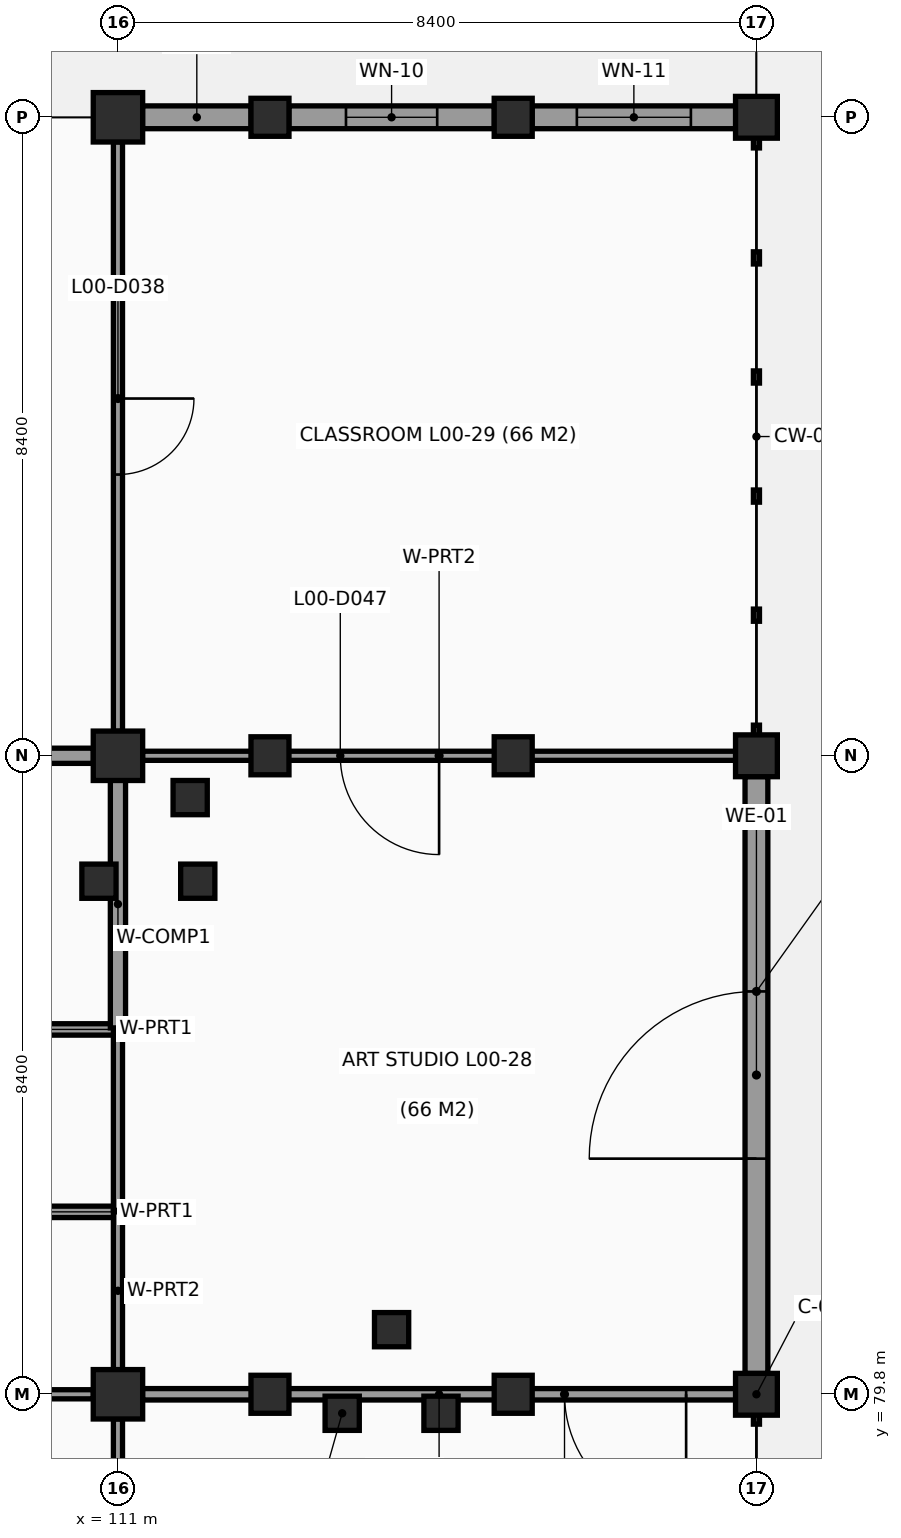
"""IFC4 building model, lengths in metres.
Left out: names, types, materials, properties, quantities, classifications, styles, units other than length and angle.
Written with IfcOpenShell. Run it as: python <this file> out.ifc"""

import sys

from ifc_helpers import new_model, si_unit, direction, frame, frame_2d, origin, origin_2d, place, context, subcontext, project, spatial, rectangle, extrude, element, fill, save


model = new_model("IFC4")
c1 = context("Model", 3, precision=1e-05, world=origin(), true_north=direction((0.0, 1.0)))
c2 = subcontext(c1, "Body", "Model", "MODEL_VIEW")
j1 = project(units=[si_unit("LENGTHUNIT", "METRE"), si_unit("PLANEANGLEUNIT", "RADIAN")], contexts=[c1])
p1 = place(None, origin())
s1 = spatial("IfcSite", under=j1, at=p1, CompositionType="ELEMENT")
p2 = place(p1, origin())
s2 = spatial("IfcBuilding", under=s1, at=p2, CompositionType="ELEMENT")
p3 = place(p2, origin())
s3 = spatial("IfcBuildingStorey", under=s2, at=p3, CompositionType="ELEMENT", Elevation=0.0)
for number, where, z_axis, x_axis in (
    (1, (111.0, 79.8, -0.4), (0.0, 0.0, 1.0), (1.0, 0.0, 0.0)),
    (2, (111.0, 88.2, -0.4), (0.0, 0.0, 1.0), (1.0, 0.0, 0.0)),
    (3, (111.0, 96.6, -0.4), (0.0, 0.0, 1.0), (1.0, 0.0, 0.0)),
):
    element("IfcColumn", number, at=place(p3, frame(where, z_axis=z_axis, x_axis=x_axis)), inside=s3, PredefinedType="COLUMN", context=c2, shape_type="SweptSolid", body=[
        extrude(rectangle(XDim=0.65, YDim=0.65, at=origin_2d()), origin(), (0.0, 0.0, 1.0), 4.6),
    ])
for number, where, z_axis, x_axis in (
    (4, (119.4, 79.8, -0.4), (0.0, 0.0, 1.0), (1.0, 0.0, 0.0)),
    (5, (119.4, 88.2, -0.4), (0.0, 0.0, 1.0), (1.0, 0.0, 0.0)),
    (6, (119.4, 96.6, -0.4), (0.0, 0.0, 1.0), (1.0, 0.0, 0.0)),
):
    element("IfcColumn", number, at=place(p3, frame(where, z_axis=z_axis, x_axis=x_axis)), inside=s3, PredefinedType="COLUMN", context=c2, shape_type="SweptSolid", body=[
        extrude(rectangle(XDim=0.55, YDim=0.55, at=origin_2d()), origin(), (0.0, 0.0, 1.0), 4.6),
    ])
for number, where, z_axis, x_axis in (
    (7, (116.2, 79.8, -0.4), (0.0, 0.0, 1.0), (1.0, 0.0, 0.0)),
    (8, (116.2, 88.2, -0.4), (0.0, 0.0, 1.0), (1.0, 0.0, 0.0)),
    (9, (116.2, 96.6, -0.4), (0.0, 0.0, 1.0), (1.0, 0.0, 0.0)),
    (10, (113.0, 79.8, -0.4), (0.0, 0.0, 1.0), (1.0, 0.0, 0.0)),
    (11, (113.0, 88.2, -0.4), (0.0, 0.0, 1.0), (1.0, 0.0, 0.0)),
    (12, (113.0, 96.6, -0.4), (0.0, 0.0, 1.0), (1.0, 0.0, 0.0)),
):
    element("IfcColumn", number, at=place(p3, frame(where, z_axis=z_axis, x_axis=x_axis)), inside=s3, PredefinedType="COLUMN", context=c2, shape_type="SweptSolid", body=[
        extrude(rectangle(XDim=0.5, YDim=0.5, at=origin_2d()), origin(), (0.0, 0.0, 1.0), 4.6),
    ])
for number, where, z_axis, x_axis in (
    (13, (113.95, 79.55, -0.4), (0.0, 0.0, 1.0), (1.0, 0.0, 0.0)),
    (14, (115.25, 79.55, -0.4), (0.0, 0.0, 1.0), (1.0, 0.0, 0.0)),
    (15, (114.6, 80.65, -0.4), (0.0, 0.0, 1.0), (1.0, 0.0, 0.0)),
    (16, (110.75, 86.55, -0.4), (0.0, 0.0, 1.0), (1.0, 0.0, 0.0)),
    (17, (112.05, 86.55, -0.4), (0.0, 0.0, 1.0), (1.0, 0.0, 0.0)),
    (18, (111.95, 87.65, -0.4), (0.0, 0.0, 1.0), (1.0, 0.0, 0.0)),
):
    element("IfcColumn", number, at=place(p3, frame(where, z_axis=z_axis, x_axis=x_axis)), inside=s3, PredefinedType="COLUMN", context=c2, shape_type="SweptSolid", body=[
        extrude(rectangle(XDim=0.45, YDim=0.45, at=origin_2d()), origin(), (0.0, 0.0, 1.0), 4.6),
    ])
p4 = place(p3, frame((111.323, 96.6, 0.0), z_axis=(0.0, 0.0, 1.0), x_axis=(1.0, 0.0, 0.0)))
e19 = element("IfcWall", 19, at=p4, inside=s3, PredefinedType="SOLIDWALL", context=c2, shape_type="SweptSolid", body=[
    extrude(rectangle(XDim=1.429, YDim=0.3, at=frame_2d((0.714, 0.0))), origin(), (0.0, 0.0, 1.0), 3.22),
])
p5 = place(p3, frame((113.248, 96.6, 0.0), z_axis=(0.0, 0.0, 1.0), x_axis=(1.0, 0.0, 0.0)))
e20 = element("IfcWall", 20, at=p5, inside=s3, PredefinedType="SOLIDWALL", context=c2, shape_type="SweptSolid", body=[
    extrude(rectangle(XDim=2.704, YDim=0.3, at=frame_2d((1.352, 0.0))), origin(), (0.0, 0.0, 1.0), 3.22),
])
p6 = place(p5, frame((0.752, 0.0, 0.95)))
e21 = element("IfcOpeningElement", 21, at=p6, cuts=e20, PredefinedType="OPENING", context=c2, shape_type="SweptSolid", body=[
    extrude(rectangle(XDim=1.2, YDim=1.5, at=frame_2d((0.6, 0.75))), frame((0.0, 0.16, 0.0), z_axis=(0.0, -1.0, 0.0), x_axis=(1.0, 0.0, 0.0)), (0.0, 0.0, 1.0), 0.32),
])
p7 = place(p3, frame((116.448, 96.6, 0.0), z_axis=(0.0, 0.0, 1.0), x_axis=(1.0, 0.0, 0.0)))
e22 = element("IfcWall", 22, at=p7, inside=s3, PredefinedType="SOLIDWALL", context=c2, shape_type="SweptSolid", body=[
    extrude(rectangle(XDim=2.679, YDim=0.3, at=frame_2d((1.339, 0.0))), origin(), (0.0, 0.0, 1.0), 3.22),
])
p8 = place(p7, frame((0.59, 0.0, 0.95)))
e23 = element("IfcOpeningElement", 23, at=p8, cuts=e22, PredefinedType="OPENING", context=c2, shape_type="SweptSolid", body=[
    extrude(rectangle(XDim=1.5, YDim=1.5, at=frame_2d((0.75, 0.75))), frame((0.0, 0.16, 0.0), z_axis=(0.0, -1.0, 0.0), x_axis=(1.0, 0.0, 0.0)), (0.0, 0.0, 1.0), 0.32),
])
p9 = place(p3, frame((119.4, 87.927, 0.0), z_axis=(0.0, 0.0, 1.0), x_axis=(0.0, -1.0, 0.0)))
e24 = element("IfcWall", 24, at=p9, inside=s3, PredefinedType="SOLIDWALL", context=c2, shape_type="SweptSolid", body=[
    extrude(rectangle(XDim=7.854, YDim=0.3, at=frame_2d((3.927, 0.0))), origin(), (0.0, 0.0, 1.0), 3.22),
])
p10 = place(p9, frame((2.827, 0.0, 0.0)))
e25 = element("IfcOpeningElement", 25, at=p10, cuts=e24, PredefinedType="OPENING", context=c2, shape_type="SweptSolid", body=[
    extrude(rectangle(XDim=2.2, YDim=2.35, at=frame_2d((1.1, 1.175))), frame((0.0, 0.16, 0.0), z_axis=(0.0, -1.0, 0.0), x_axis=(1.0, 0.0, 0.0)), (0.0, 0.0, 1.0), 0.32),
])
p11 = place(p3, frame((110.677, 79.8, 0.0), z_axis=(0.0, 0.0, 1.0), x_axis=(-1.0, 0.0, 0.0)))
e26 = element("IfcWall", 26, at=p11, inside=s3, PredefinedType="PARTITIONING", context=c2, shape_type="SweptSolid", body=[
    extrude(rectangle(XDim=3.857, YDim=0.12, at=frame_2d((1.928, 0.0))), origin(), (0.0, 0.0, 1.0), 3.12),
])
p12 = place(p3, frame((106.82, 82.2, 0.0), z_axis=(0.0, 0.0, 1.0), x_axis=(1.0, 0.0, 0.0)))
e27 = element("IfcWall", 27, at=p12, inside=s3, PredefinedType="PARTITIONING", context=c2, shape_type="SweptSolid", body=[
    extrude(rectangle(XDim=4.18, YDim=0.15, at=frame_2d((2.09, 0.0))), origin(), (0.0, 0.0, 1.0), 3.27),
])
p13 = place(p12, frame((1.465, 0.0, 0.0)))
e28 = element("IfcOpeningElement", 28, at=p13, cuts=e27, PredefinedType="OPENING", context=c2, shape_type="SweptSolid", body=[
    extrude(rectangle(XDim=1.25, YDim=2.15, at=frame_2d((0.625, 1.075))), frame((0.0, 0.085, 0.0), z_axis=(0.0, -1.0, 0.0), x_axis=(1.0, 0.0, 0.0)), (0.0, 0.0, 1.0), 0.17),
])
p14 = place(p3, frame((111.0, 82.2, 0.0), z_axis=(0.0, 0.0, 1.0), x_axis=(0.0, -1.0, 0.0)))
e29 = element("IfcWall", 29, at=p14, inside=s3, PredefinedType="PARTITIONING", context=c2, shape_type="SweptSolid", body=[
    extrude(rectangle(XDim=2.077, YDim=0.12, at=frame_2d((1.039, 0.0))), origin(), (0.0, 0.0, 1.0), 3.27),
])
p15 = place(p3, frame((106.8, 84.6, 0.0), z_axis=(0.0, 0.0, 1.0), x_axis=(1.0, 0.0, 0.0)))
e30 = element("IfcWall", 30, at=p15, inside=s3, PredefinedType="PARTITIONING", context=c2, shape_type="SweptSolid", body=[
    extrude(rectangle(XDim=4.2, YDim=0.15, at=frame_2d((2.1, 0.0))), origin(), (0.0, 0.0, 1.0), 3.27),
])
p16 = place(p15, frame((1.575, 0.0, 0.0)))
e31 = element("IfcOpeningElement", 31, at=p16, cuts=e30, PredefinedType="OPENING", context=c2, shape_type="SweptSolid", body=[
    extrude(rectangle(XDim=1.05, YDim=2.15, at=frame_2d((0.525, 1.075))), frame((0.0, 0.085, 0.0), z_axis=(0.0, -1.0, 0.0), x_axis=(1.0, 0.0, 0.0)), (0.0, 0.0, 1.0), 0.17),
])
p17 = place(p3, frame((111.0, 84.6, 0.0), z_axis=(0.0, 0.0, 1.0), x_axis=(0.0, -1.0, 0.0)))
e32 = element("IfcWall", 32, at=p17, inside=s3, PredefinedType="PARTITIONING", context=c2, shape_type="SweptSolid", body=[
    extrude(rectangle(XDim=2.38, YDim=0.12, at=frame_2d((1.19, 0.0))), origin(), (0.0, 0.0, 1.0), 3.27),
])
p18 = place(p3, frame((106.82, 88.2, 0.0), z_axis=(0.0, 0.0, 1.0), x_axis=(1.0, 0.0, 0.0)))
e33 = element("IfcWall", 33, at=p18, inside=s3, PredefinedType="PARTITIONING", context=c2, shape_type="SweptSolid", body=[
    extrude(rectangle(XDim=3.857, YDim=0.2, at=frame_2d((1.928, 0.0))), origin(), (0.0, 0.0, 1.0), 3.47),
])
p19 = place(p18, frame((0.503, 0.0, 0.0)))
e34 = element("IfcOpeningElement", 34, at=p19, cuts=e33, PredefinedType="OPENING", context=c2, shape_type="SweptSolid", body=[
    extrude(rectangle(XDim=1.55, YDim=2.2, at=frame_2d((0.775, 1.1))), frame((0.0, 0.11, 0.0), z_axis=(0.0, -1.0, 0.0), x_axis=(1.0, 0.0, 0.0)), (0.0, 0.0, 1.0), 0.22),
])
p20 = place(p3, frame((111.0, 87.877, 0.0), z_axis=(0.0, 0.0, 1.0), x_axis=(0.0, -1.0, 0.0)))
e35 = element("IfcWall", 35, at=p20, inside=s3, PredefinedType="PARTITIONING", context=c2, shape_type="SweptSolid", body=[
    extrude(rectangle(XDim=3.257, YDim=0.2, at=frame_2d((1.628, 0.0))), origin(), (0.0, 0.0, 1.0), 3.27),
])
p21 = place(p3, frame((111.0, 79.477, 0.0), z_axis=(0.0, 0.0, 1.0), x_axis=(0.0, -1.0, 0.0)))
e36 = element("IfcWall", 36, at=p21, inside=s3, PredefinedType="PARTITIONING", context=c2, shape_type="SweptSolid", body=[
    extrude(rectangle(XDim=5.304, YDim=0.12, at=frame_2d((2.652, 0.0))), origin(), (0.0, 0.0, 1.0), 3.27),
])
p22 = place(p3, frame((111.0, 96.277, 0.0), z_axis=(0.0, 0.0, 1.0), x_axis=(0.0, -1.0, 0.0)))
e37 = element("IfcWall", 37, at=p22, inside=s3, PredefinedType="PARTITIONING", context=c2, shape_type="SweptSolid", body=[
    extrude(rectangle(XDim=7.754, YDim=0.12, at=frame_2d((3.877, 0.0))), origin(), (0.0, 0.0, 1.0), 3.27),
])
p23 = place(p22, frame((3.377, 0.0, 0.0)))
e38 = element("IfcOpeningElement", 38, at=p23, cuts=e37, PredefinedType="OPENING", context=c2, shape_type="SweptSolid", body=[
    extrude(rectangle(XDim=1.0, YDim=2.1, at=frame_2d((0.5, 1.05))), frame((0.0, 0.07, 0.0), z_axis=(0.0, -1.0, 0.0), x_axis=(1.0, 0.0, 0.0)), (0.0, 0.0, 1.0), 0.14),
])
p24 = place(p3, frame((111.323, 79.8, 0.0), z_axis=(0.0, 0.0, 1.0), x_axis=(1.0, 0.0, 0.0)))
e39 = element("IfcWall", 39, at=p24, inside=s3, PredefinedType="PARTITIONING", context=c2, shape_type="SweptSolid", body=[
    extrude(rectangle(XDim=7.804, YDim=0.15, at=frame_2d((3.902, 0.0))), origin(), (0.0, 0.0, 1.0), 3.12),
])
p25 = place(p24, frame((5.552, 0.0, 0.0)))
e40 = element("IfcOpeningElement", 40, at=p25, cuts=e39, PredefinedType="OPENING", context=c2, shape_type="SweptSolid", body=[
    extrude(rectangle(XDim=1.6, YDim=2.2, at=frame_2d((0.8, 1.1))), frame((0.0, 0.085, 0.0), z_axis=(0.0, -1.0, 0.0), x_axis=(1.0, 0.0, 0.0)), (0.0, 0.0, 1.0), 0.17),
])
p26 = place(p3, frame((111.323, 88.2, 0.0), z_axis=(0.0, 0.0, 1.0), x_axis=(1.0, 0.0, 0.0)))
e41 = element("IfcWall", 41, at=p26, inside=s3, PredefinedType="PARTITIONING", context=c2, shape_type="SweptSolid", body=[
    extrude(rectangle(XDim=7.804, YDim=0.12, at=frame_2d((3.902, 0.0))), origin(), (0.0, 0.0, 1.0), 3.47),
])
p27 = place(p26, frame((2.602, 0.0, 0.0)))
e42 = element("IfcOpeningElement", 42, at=p27, cuts=e41, PredefinedType="OPENING", context=c2, shape_type="SweptSolid", body=[
    extrude(rectangle(XDim=1.3, YDim=2.15, at=frame_2d((0.65, 1.075))), frame((0.0, 0.07, 0.0), z_axis=(0.0, -1.0, 0.0), x_axis=(1.0, 0.0, 0.0)), (0.0, 0.0, 1.0), 0.14),
])
p28 = place(p6, origin())
e43 = element("IfcWindow", 43, at=p28, inside=s3, PartitioningType="SINGLE_PANEL", PredefinedType="WINDOW", context=c2, shape_type="SweptSolid", body=[
    extrude(rectangle(XDim=1.2, YDim=1.5, at=frame_2d((0.6, 0.75))), frame((0.0, 0.03, 0.0), z_axis=(0.0, -1.0, 0.0), x_axis=(1.0, 0.0, 0.0)), (0.0, 0.0, 1.0), 0.06),
])
fill(e21, e43)
p29 = place(p8, origin())
e44 = element("IfcWindow", 44, at=p29, inside=s3, PartitioningType="SINGLE_PANEL", PredefinedType="WINDOW", context=c2, shape_type="SweptSolid", body=[
    extrude(rectangle(XDim=1.5, YDim=1.5, at=frame_2d((0.75, 0.75))), frame((0.0, 0.03, 0.0), z_axis=(0.0, -1.0, 0.0), x_axis=(1.0, 0.0, 0.0)), (0.0, 0.0, 1.0), 0.06),
])
fill(e23, e44)
p30 = place(p10, origin())
e45 = element("IfcDoor", 45, at=p30, inside=s3, OperationType="DOUBLE_DOOR_SINGLE_SWING", PredefinedType="DOOR", context=c2, shape_type="SweptSolid", body=[
    extrude(rectangle(XDim=2.2, YDim=2.35, at=frame_2d((1.1, 1.175))), frame((0.0, 0.025, 0.0), z_axis=(0.0, -1.0, 0.0), x_axis=(1.0, 0.0, 0.0)), (0.0, 0.0, 1.0), 0.05),
])
fill(e25, e45)
p31 = place(p23, origin())
e46 = element("IfcDoor", 46, at=p31, inside=s3, OperationType="SINGLE_SWING_LEFT", PredefinedType="DOOR", context=c2, shape_type="SweptSolid", body=[
    extrude(rectangle(XDim=1.0, YDim=2.1, at=frame_2d((0.5, 1.05))), frame((0.0, 0.025, 0.0), z_axis=(0.0, -1.0, 0.0), x_axis=(1.0, 0.0, 0.0)), (0.0, 0.0, 1.0), 0.05),
])
fill(e38, e46)
p32 = place(p25, origin())
e47 = element("IfcDoor", 47, at=p32, inside=s3, OperationType="DOUBLE_DOOR_SINGLE_SWING", PredefinedType="DOOR", context=c2, shape_type="SweptSolid", body=[
    extrude(rectangle(XDim=1.6, YDim=2.2, at=frame_2d((0.8, 1.1))), frame((0.0, 0.025, 0.0), z_axis=(0.0, -1.0, 0.0), x_axis=(1.0, 0.0, 0.0)), (0.0, 0.0, 1.0), 0.05),
])
fill(e40, e47)
p33 = place(p27, origin())
e48 = element("IfcDoor", 48, at=p33, inside=s3, OperationType="SINGLE_SWING_RIGHT", PredefinedType="DOOR", context=c2, shape_type="SweptSolid", body=[
    extrude(rectangle(XDim=1.3, YDim=2.15, at=frame_2d((0.65, 1.075))), frame((0.0, 0.025, 0.0), z_axis=(0.0, -1.0, 0.0), x_axis=(1.0, 0.0, 0.0)), (0.0, 0.0, 1.0), 0.05),
])
fill(e42, e48)
save(model, sys.argv[1])
